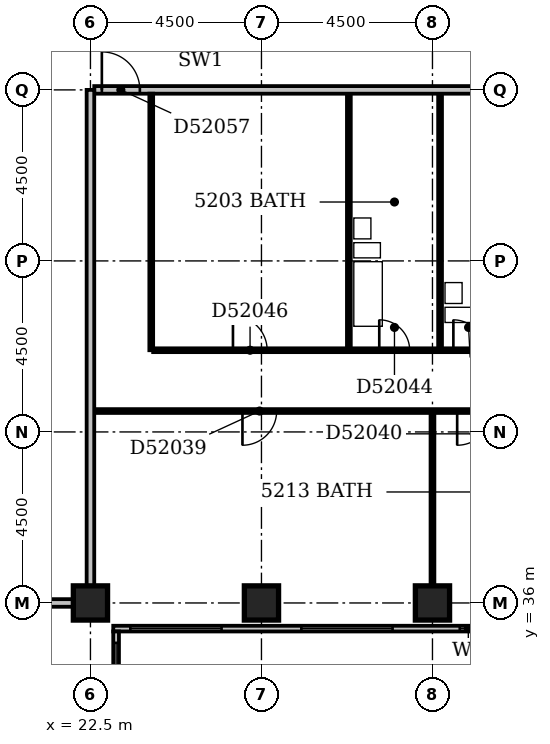
"""IFC4 building model, lengths in metres.
Left out: names, types, materials, properties, quantities, classifications, styles, units other than length and angle.
Written with IfcOpenShell. Run it as: python <this file> out.ifc"""

import sys

from ifc_helpers import new_model, si_unit, direction, frame, frame_2d, origin, origin_2d, place, context, subcontext, project, spatial, rectangle, extrude, element, fill, save


model = new_model("IFC4")
c1 = context("Model", 3, precision=1e-05, world=origin(), true_north=direction((0.0, 1.0)))
c2 = subcontext(c1, "Body", "Model", "MODEL_VIEW")
j1 = project(units=[si_unit("LENGTHUNIT", "METRE"), si_unit("PLANEANGLEUNIT", "RADIAN")], contexts=[c1])
p1 = place(None, origin())
s1 = spatial("IfcSite", under=j1, at=p1, CompositionType="ELEMENT")
p2 = place(p1, origin())
s2 = spatial("IfcBuilding", under=s1, at=p2, CompositionType="ELEMENT")
p3 = place(p2, frame((0.0, 0.0, 204.2)))
s3 = spatial("IfcBuildingStorey", under=s2, at=p3, CompositionType="ELEMENT", Elevation=204.2)
for number, where, z_axis, x_axis in (
    (1, (22.5, 36.0, -0.3), (0.0, 0.0, 1.0), (1.0, 0.0, 0.0)),
    (2, (27.0, 36.0, -0.3), (0.0, 0.0, 1.0), (1.0, 0.0, 0.0)),
    (3, (31.5, 36.0, -0.3), (0.0, 0.0, 1.0), (1.0, 0.0, 0.0)),
):
    element("IfcColumn", number, at=place(p3, frame(where, z_axis=z_axis, x_axis=x_axis)), inside=s3, PredefinedType="COLUMN", context=c2, shape_type="SweptSolid", body=[
        extrude(rectangle(XDim=0.9, YDim=0.9, at=origin_2d()), origin(), (0.0, 0.0, 1.0), 3.6),
    ])
p4 = place(p3, frame((23.175, 17.4, 0.0), z_axis=(0.0, 0.0, 1.0), x_axis=(0.0, 1.0, 0.0)))
e4 = element("IfcWall", 4, at=p4, inside=s3, PredefinedType="STANDARD", context=c2, shape_type="SweptSolid", body=[
    extrude(rectangle(XDim=17.85, YDim=0.15, at=frame_2d((8.925, 0.0))), origin(), (0.0, 0.0, 1.0), 2.7),
])
p5 = place(p4, frame((1.65, 0.0, 0.6)))
e5 = element("IfcOpeningElement", 5, at=p5, cuts=e4, PredefinedType="OPENING", context=c2, shape_type="SweptSolid", body=[
    extrude(rectangle(XDim=2.4, YDim=1.8, at=frame_2d((1.2, 0.9))), frame((0.0, 0.087, 0.0), z_axis=(0.0, -1.0, 0.0), x_axis=(1.0, 0.0, 0.0)), (0.0, 0.0, 1.0), 0.174),
])
p6 = place(p4, frame((6.15, 0.0, 0.6)))
e6 = element("IfcOpeningElement", 6, at=p6, cuts=e4, PredefinedType="OPENING", context=c2, shape_type="SweptSolid", body=[
    extrude(rectangle(XDim=2.4, YDim=1.8, at=frame_2d((1.2, 0.9))), frame((0.0, 0.087, 0.0), z_axis=(0.0, -1.0, 0.0), x_axis=(1.0, 0.0, 0.0)), (0.0, 0.0, 1.0), 0.174),
])
p7 = place(p4, frame((10.65, 0.0, 0.6)))
e7 = element("IfcOpeningElement", 7, at=p7, cuts=e4, PredefinedType="OPENING", context=c2, shape_type="SweptSolid", body=[
    extrude(rectangle(XDim=2.4, YDim=1.8, at=frame_2d((1.2, 0.9))), frame((0.0, 0.087, 0.0), z_axis=(0.0, -1.0, 0.0), x_axis=(1.0, 0.0, 0.0)), (0.0, 0.0, 1.0), 0.174),
])
p8 = place(p4, frame((15.15, 0.0, 0.6)))
e8 = element("IfcOpeningElement", 8, at=p8, cuts=e4, PredefinedType="OPENING", context=c2, shape_type="SweptSolid", body=[
    extrude(rectangle(XDim=2.4, YDim=1.8, at=frame_2d((1.2, 0.9))), frame((0.0, 0.087, 0.0), z_axis=(0.0, -1.0, 0.0), x_axis=(1.0, 0.0, 0.0)), (0.0, 0.0, 1.0), 0.174),
])
p9 = place(p3, frame((23.1, 35.325, 0.0), z_axis=(0.0, 0.0, 1.0), x_axis=(1.0, 0.0, 0.0)))
e9 = element("IfcWall", 9, at=p9, inside=s3, PredefinedType="STANDARD", context=c2, shape_type="SweptSolid", body=[
    extrude(rectangle(XDim=27.15, YDim=0.15, at=frame_2d((13.575, 0.0))), origin(), (0.0, 0.0, 1.0), 2.7),
])
p10 = place(p9, frame((0.45, 0.0, 0.6)))
e10 = element("IfcOpeningElement", 10, at=p10, cuts=e9, PredefinedType="OPENING", context=c2, shape_type="SweptSolid", body=[
    extrude(rectangle(XDim=2.4, YDim=1.8, at=frame_2d((1.2, 0.9))), frame((0.0, 0.087, 0.0), z_axis=(0.0, -1.0, 0.0), x_axis=(1.0, 0.0, 0.0)), (0.0, 0.0, 1.0), 0.174),
])
p11 = place(p9, frame((4.95, 0.0, 0.6)))
e11 = element("IfcOpeningElement", 11, at=p11, cuts=e9, PredefinedType="OPENING", context=c2, shape_type="SweptSolid", body=[
    extrude(rectangle(XDim=2.4, YDim=1.8, at=frame_2d((1.2, 0.9))), frame((0.0, 0.087, 0.0), z_axis=(0.0, -1.0, 0.0), x_axis=(1.0, 0.0, 0.0)), (0.0, 0.0, 1.0), 0.174),
])
p12 = place(p9, frame((9.118, 0.0, 0.6)))
e12 = element("IfcOpeningElement", 12, at=p12, cuts=e9, PredefinedType="OPENING", context=c2, shape_type="SweptSolid", body=[
    extrude(rectangle(XDim=0.45, YDim=1.8, at=frame_2d((0.225, 0.9))), frame((0.0, 0.087, 0.0), z_axis=(0.0, -1.0, 0.0), x_axis=(1.0, 0.0, 0.0)), (0.0, 0.0, 1.0), 0.174),
])
p13 = place(p9, frame((11.218, 0.0, 0.6)))
e13 = element("IfcOpeningElement", 13, at=p13, cuts=e9, PredefinedType="OPENING", context=c2, shape_type="SweptSolid", body=[
    extrude(rectangle(XDim=0.9, YDim=1.8, at=frame_2d((0.45, 0.9))), frame((0.0, 0.087, 0.0), z_axis=(0.0, -1.0, 0.0), x_axis=(1.0, 0.0, 0.0)), (0.0, 0.0, 1.0), 0.174),
])
p14 = place(p9, frame((13.61, 0.0, 0.6)))
e14 = element("IfcOpeningElement", 14, at=p14, cuts=e9, PredefinedType="OPENING", context=c2, shape_type="SweptSolid", body=[
    extrude(rectangle(XDim=1.2, YDim=1.8, at=frame_2d((0.6, 0.9))), frame((0.0, 0.087, 0.0), z_axis=(0.0, -1.0, 0.0), x_axis=(1.0, 0.0, 0.0)), (0.0, 0.0, 1.0), 0.174),
])
p15 = place(p9, frame((18.45, 0.0, 0.6)))
e15 = element("IfcOpeningElement", 15, at=p15, cuts=e9, PredefinedType="OPENING", context=c2, shape_type="SweptSolid", body=[
    extrude(rectangle(XDim=2.4, YDim=1.8, at=frame_2d((1.2, 0.9))), frame((0.0, 0.087, 0.0), z_axis=(0.0, -1.0, 0.0), x_axis=(1.0, 0.0, 0.0)), (0.0, 0.0, 1.0), 0.174),
])
p16 = place(p9, frame((22.95, 0.0, 0.6)))
e16 = element("IfcOpeningElement", 16, at=p16, cuts=e9, PredefinedType="OPENING", context=c2, shape_type="SweptSolid", body=[
    extrude(rectangle(XDim=2.4, YDim=1.8, at=frame_2d((1.2, 0.9))), frame((0.0, 0.087, 0.0), z_axis=(0.0, -1.0, 0.0), x_axis=(1.0, 0.0, 0.0)), (0.0, 0.0, 1.0), 0.174),
])
p17 = place(p3, frame((9.1, 36.0, 0.0), z_axis=(0.0, 0.0, 1.0), x_axis=(1.0, 0.0, 0.0)))
e17 = element("IfcWall", 17, at=p17, inside=s3, PredefinedType="PARTITIONING", context=c2, shape_type="SweptSolid", body=[
    extrude(rectangle(XDim=12.95, YDim=0.2, at=frame_2d((6.475, 0.0))), origin(), (0.0, 0.0, 1.0), 3.3),
])
p18 = place(p3, frame((22.5, 36.45, 0.0), z_axis=(0.0, 0.0, 1.0), x_axis=(0.0, 1.0, 0.0)))
e18 = element("IfcWall", 18, at=p18, inside=s3, PredefinedType="PARTITIONING", context=c2, shape_type="SweptSolid", body=[
    extrude(rectangle(XDim=13.05, YDim=0.2, at=frame_2d((6.525, 0.0))), origin(), (0.0, 0.0, 1.0), 3.3),
])
p19 = place(p3, frame((31.5, 36.45, 0.0), z_axis=(0.0, 0.0, 1.0), x_axis=(0.0, 1.0, 0.0)))
e19 = element("IfcWall", 19, at=p19, inside=s3, PredefinedType="PARTITIONING", context=c2, shape_type="SweptSolid", body=[
    extrude(rectangle(XDim=4.55, YDim=0.1, at=frame_2d((2.275, 0.0))), origin(), (0.0, 0.0, 1.0), 3.3),
])
p20 = place(p3, frame((22.6, 41.05, 0.0), z_axis=(0.0, 0.0, 1.0), x_axis=(1.0, 0.0, 0.0)))
e20 = element("IfcWall", 20, at=p20, inside=s3, PredefinedType="PARTITIONING", context=c2, shape_type="SweptSolid", body=[
    extrude(rectangle(XDim=22.3, YDim=0.1, at=frame_2d((11.15, 0.0))), origin(), (0.0, 0.0, 1.0), 3.3),
])
p21 = place(p20, frame((3.9, 0.0, 0.0)))
e21 = element("IfcOpeningElement", 21, at=p21, cuts=e20, PredefinedType="OPENING", context=c2, shape_type="SweptSolid", body=[
    extrude(rectangle(XDim=0.9, YDim=2.1, at=frame_2d((0.45, 1.05))), frame((0.0, 0.062, 0.0), z_axis=(0.0, -1.0, 0.0), x_axis=(1.0, 0.0, 0.0)), (0.0, 0.0, 1.0), 0.124),
])
p22 = place(p20, frame((9.55, 0.0, 0.0)))
e22 = element("IfcOpeningElement", 22, at=p22, cuts=e20, PredefinedType="OPENING", context=c2, shape_type="SweptSolid", body=[
    extrude(rectangle(XDim=0.9, YDim=2.1, at=frame_2d((0.45, 1.05))), frame((0.0, 0.062, 0.0), z_axis=(0.0, -1.0, 0.0), x_axis=(1.0, 0.0, 0.0)), (0.0, 0.0, 1.0), 0.124),
])
p23 = place(p20, frame((16.35, 0.0, 0.0)))
e23 = element("IfcOpeningElement", 23, at=p23, cuts=e20, PredefinedType="OPENING", context=c2, shape_type="SweptSolid", body=[
    extrude(rectangle(XDim=0.9, YDim=2.1, at=frame_2d((0.45, 1.05))), frame((0.0, 0.062, 0.0), z_axis=(0.0, -1.0, 0.0), x_axis=(1.0, 0.0, 0.0)), (0.0, 0.0, 1.0), 0.124),
])
p24 = place(p20, frame((19.7, 0.0, 0.0)))
e24 = element("IfcOpeningElement", 24, at=p24, cuts=e20, PredefinedType="OPENING", context=c2, shape_type="SweptSolid", body=[
    extrude(rectangle(XDim=0.9, YDim=2.1, at=frame_2d((0.45, 1.05))), frame((0.0, 0.062, 0.0), z_axis=(0.0, -1.0, 0.0), x_axis=(1.0, 0.0, 0.0)), (0.0, 0.0, 1.0), 0.124),
])
p25 = place(p3, frame((24.1, 42.65, 0.0), z_axis=(0.0, 0.0, 1.0), x_axis=(0.0, 1.0, 0.0)))
e25 = element("IfcWall", 25, at=p25, inside=s3, PredefinedType="PARTITIONING", context=c2, shape_type="SweptSolid", body=[
    extrude(rectangle(XDim=6.75, YDim=0.1, at=frame_2d((3.375, 0.0))), origin(), (0.0, 0.0, 1.0), 3.3),
])
p26 = place(p3, frame((24.15, 42.65, 0.0), z_axis=(0.0, 0.0, 1.0), x_axis=(1.0, 0.0, 0.0)))
e26 = element("IfcWall", 26, at=p26, inside=s3, PredefinedType="PARTITIONING", context=c2, shape_type="SweptSolid", body=[
    extrude(rectangle(XDim=20.75, YDim=0.1, at=frame_2d((10.375, 0.0))), origin(), (0.0, 0.0, 1.0), 3.3),
])
p27 = place(p26, frame((5.95, 0.0, 0.0)))
e27 = element("IfcOpeningElement", 27, at=p27, cuts=e26, PredefinedType="OPENING", context=c2, shape_type="SweptSolid", body=[
    extrude(rectangle(XDim=0.8, YDim=2.1, at=frame_2d((0.4, 1.05))), frame((0.0, 0.062, 0.0), z_axis=(0.0, -1.0, 0.0), x_axis=(1.0, 0.0, 0.0)), (0.0, 0.0, 1.0), 0.124),
])
p28 = place(p26, frame((11.35, 0.0, 0.0)))
e28 = element("IfcOpeningElement", 28, at=p28, cuts=e26, PredefinedType="OPENING", context=c2, shape_type="SweptSolid", body=[
    extrude(rectangle(XDim=0.8, YDim=2.1, at=frame_2d((0.4, 1.05))), frame((0.0, 0.062, 0.0), z_axis=(0.0, -1.0, 0.0), x_axis=(1.0, 0.0, 0.0)), (0.0, 0.0, 1.0), 0.124),
])
p29 = place(p26, frame((2.1, 0.0, 0.0)))
e29 = element("IfcOpeningElement", 29, at=p29, cuts=e26, PredefinedType="OPENING", context=c2, shape_type="SweptSolid", body=[
    extrude(rectangle(XDim=0.9, YDim=2.1, at=frame_2d((0.45, 1.05))), frame((0.0, 0.062, 0.0), z_axis=(0.0, -1.0, 0.0), x_axis=(1.0, 0.0, 0.0)), (0.0, 0.0, 1.0), 0.124),
])
p30 = place(p26, frame((19.35, 0.0, 0.0)))
e30 = element("IfcOpeningElement", 30, at=p30, cuts=e26, PredefinedType="OPENING", context=c2, shape_type="SweptSolid", body=[
    extrude(rectangle(XDim=0.8, YDim=2.1, at=frame_2d((0.4, 1.05))), frame((0.0, 0.062, 0.0), z_axis=(0.0, -1.0, 0.0), x_axis=(1.0, 0.0, 0.0)), (0.0, 0.0, 1.0), 0.124),
])
p31 = place(p26, frame((15.45, 0.0, 0.0)))
e31 = element("IfcOpeningElement", 31, at=p31, cuts=e26, PredefinedType="OPENING", context=c2, shape_type="SweptSolid", body=[
    extrude(rectangle(XDim=0.8, YDim=2.1, at=frame_2d((0.4, 1.05))), frame((0.0, 0.062, 0.0), z_axis=(0.0, -1.0, 0.0), x_axis=(1.0, 0.0, 0.0)), (0.0, 0.0, 1.0), 0.124),
])
p32 = place(p26, frame((9.45, 0.0, 0.0)))
e32 = element("IfcOpeningElement", 32, at=p32, cuts=e26, PredefinedType="OPENING", context=c2, shape_type="SweptSolid", body=[
    extrude(rectangle(XDim=0.8, YDim=2.1, at=frame_2d((0.4, 1.05))), frame((0.0, 0.062, 0.0), z_axis=(0.0, -1.0, 0.0), x_axis=(1.0, 0.0, 0.0)), (0.0, 0.0, 1.0), 0.124),
])
p33 = place(p26, frame((13.45, 0.0, 0.0)))
e33 = element("IfcOpeningElement", 33, at=p33, cuts=e26, PredefinedType="OPENING", context=c2, shape_type="SweptSolid", body=[
    extrude(rectangle(XDim=0.8, YDim=2.1, at=frame_2d((0.4, 1.05))), frame((0.0, 0.062, 0.0), z_axis=(0.0, -1.0, 0.0), x_axis=(1.0, 0.0, 0.0)), (0.0, 0.0, 1.0), 0.124),
])
p34 = place(p26, frame((17.35, 0.0, 0.0)))
e34 = element("IfcOpeningElement", 34, at=p34, cuts=e26, PredefinedType="OPENING", context=c2, shape_type="SweptSolid", body=[
    extrude(rectangle(XDim=0.8, YDim=2.1, at=frame_2d((0.4, 1.05))), frame((0.0, 0.062, 0.0), z_axis=(0.0, -1.0, 0.0), x_axis=(1.0, 0.0, 0.0)), (0.0, 0.0, 1.0), 0.124),
])
p35 = place(p26, frame((7.9, 0.0, 0.0)))
e35 = element("IfcOpeningElement", 35, at=p35, cuts=e26, PredefinedType="OPENING", context=c2, shape_type="SweptSolid", body=[
    extrude(rectangle(XDim=0.8, YDim=2.1, at=frame_2d((0.4, 1.05))), frame((0.0, 0.062, 0.0), z_axis=(0.0, -1.0, 0.0), x_axis=(1.0, 0.0, 0.0)), (0.0, 0.0, 1.0), 0.124),
])
for number, where, z_axis, x_axis in (
    (36, (29.3, 42.7, 0.0), (0.0, 0.0, 1.0), (0.0, 1.0, 0.0)),
    (37, (31.7, 42.7, 0.0), (0.0, 0.0, 1.0), (0.0, 1.0, 0.0)),
):
    element("IfcWall", number, at=place(p3, frame(where, z_axis=z_axis, x_axis=x_axis)), inside=s3, PredefinedType="PLUMBINGWALL", context=c2, shape_type="SweptSolid", body=[
        extrude(rectangle(XDim=6.7, YDim=0.1, at=frame_2d((3.35, 0.0))), origin(), (0.0, 0.0, 1.0), 3.3),
    ])
p36 = place(p3, frame((22.6, 49.5, 0.0), z_axis=(0.0, 0.0, 1.0), x_axis=(1.0, 0.0, 0.0)))
e38 = element("IfcWall", 38, at=p36, inside=s3, PredefinedType="PARTITIONING", context=c2, shape_type="SweptSolid", body=[
    extrude(rectangle(XDim=30.95, YDim=0.2, at=frame_2d((15.475, 0.0))), origin(), (0.0, 0.0, 1.0), 3.3),
])
p37 = place(p36, frame((0.2, 0.0, 0.0)))
e39 = element("IfcOpeningElement", 39, at=p37, cuts=e38, PredefinedType="OPENING", context=c2, shape_type="SweptSolid", body=[
    extrude(rectangle(XDim=1.0, YDim=2.1, at=frame_2d((0.5, 1.05))), frame((0.0, 0.112, 0.0), z_axis=(0.0, -1.0, 0.0), x_axis=(1.0, 0.0, 0.0)), (0.0, 0.0, 1.0), 0.224),
])
p38 = place(p36, frame((22.7, 0.0, 0.0)))
e40 = element("IfcOpeningElement", 40, at=p38, cuts=e38, PredefinedType="OPENING", context=c2, shape_type="SweptSolid", body=[
    extrude(rectangle(XDim=1.0, YDim=2.1, at=frame_2d((0.5, 1.05))), frame((0.0, 0.112, 0.0), z_axis=(0.0, -1.0, 0.0), x_axis=(1.0, 0.0, 0.0)), (0.0, 0.0, 1.0), 0.224),
])
p39 = place(p8, origin())
e41 = element("IfcWindow", 41, at=p39, inside=s3, PartitioningType="SINGLE_PANEL", PredefinedType="WINDOW", context=c2, shape_type="SweptSolid", body=[
    extrude(rectangle(XDim=2.4, YDim=1.8, at=frame_2d((1.2, 0.9))), frame((0.0, 0.03, 0.0), z_axis=(0.0, -1.0, 0.0), x_axis=(1.0, 0.0, 0.0)), (0.0, 0.0, 1.0), 0.06),
])
fill(e8, e41)
p40 = place(p10, origin())
e42 = element("IfcWindow", 42, at=p40, inside=s3, PartitioningType="SINGLE_PANEL", PredefinedType="WINDOW", context=c2, shape_type="SweptSolid", body=[
    extrude(rectangle(XDim=2.4, YDim=1.8, at=frame_2d((1.2, 0.9))), frame((0.0, 0.03, 0.0), z_axis=(0.0, -1.0, 0.0), x_axis=(1.0, 0.0, 0.0)), (0.0, 0.0, 1.0), 0.06),
])
fill(e10, e42)
p41 = place(p11, origin())
e43 = element("IfcWindow", 43, at=p41, inside=s3, PartitioningType="SINGLE_PANEL", PredefinedType="WINDOW", context=c2, shape_type="SweptSolid", body=[
    extrude(rectangle(XDim=2.4, YDim=1.8, at=frame_2d((1.2, 0.9))), frame((0.0, 0.03, 0.0), z_axis=(0.0, -1.0, 0.0), x_axis=(1.0, 0.0, 0.0)), (0.0, 0.0, 1.0), 0.06),
])
fill(e11, e43)
p42 = place(p12, origin())
e44 = element("IfcWindow", 44, at=p42, inside=s3, PartitioningType="SINGLE_PANEL", PredefinedType="WINDOW", context=c2, shape_type="SweptSolid", body=[
    extrude(rectangle(XDim=0.45, YDim=1.8, at=frame_2d((0.225, 0.9))), frame((0.0, 0.03, 0.0), z_axis=(0.0, -1.0, 0.0), x_axis=(1.0, 0.0, 0.0)), (0.0, 0.0, 1.0), 0.06),
])
fill(e12, e44)
p43 = place(p21, frame((0.9, 0.0, 0.0), z_axis=(0.0, 0.0, 1.0), x_axis=(-1.0, 0.0, 0.0)))
e45 = element("IfcDoor", 45, at=p43, inside=s3, OperationType="SINGLE_SWING_RIGHT", PredefinedType="DOOR", context=c2, shape_type="SweptSolid", body=[
    extrude(rectangle(XDim=0.9, YDim=2.1, at=frame_2d((0.45, 1.05))), frame((0.0, 0.025, 0.0), z_axis=(0.0, -1.0, 0.0), x_axis=(1.0, 0.0, 0.0)), (0.0, 0.0, 1.0), 0.05),
])
fill(e21, e45)
p44 = place(p22, frame((0.9, 0.0, 0.0), z_axis=(0.0, 0.0, 1.0), x_axis=(-1.0, 0.0, 0.0)))
e46 = element("IfcDoor", 46, at=p44, inside=s3, OperationType="SINGLE_SWING_RIGHT", PredefinedType="DOOR", context=c2, shape_type="SweptSolid", body=[
    extrude(rectangle(XDim=0.9, YDim=2.1, at=frame_2d((0.45, 1.05))), frame((0.0, 0.025, 0.0), z_axis=(0.0, -1.0, 0.0), x_axis=(1.0, 0.0, 0.0)), (0.0, 0.0, 1.0), 0.05),
])
fill(e22, e46)
p45 = place(p27, origin())
e47 = element("IfcDoor", 47, at=p45, inside=s3, OperationType="SINGLE_SWING_LEFT", PredefinedType="DOOR", context=c2, shape_type="SweptSolid", body=[
    extrude(rectangle(XDim=0.8, YDim=2.1, at=frame_2d((0.4, 1.05))), frame((0.0, 0.025, 0.0), z_axis=(0.0, -1.0, 0.0), x_axis=(1.0, 0.0, 0.0)), (0.0, 0.0, 1.0), 0.05),
])
fill(e27, e47)
p46 = place(p29, origin())
e48 = element("IfcDoor", 48, at=p46, inside=s3, OperationType="SINGLE_SWING_LEFT", PredefinedType="DOOR", context=c2, shape_type="SweptSolid", body=[
    extrude(rectangle(XDim=0.9, YDim=2.1, at=frame_2d((0.45, 1.05))), frame((0.0, 0.025, 0.0), z_axis=(0.0, -1.0, 0.0), x_axis=(1.0, 0.0, 0.0)), (0.0, 0.0, 1.0), 0.05),
])
fill(e29, e48)
p47 = place(p35, origin())
e49 = element("IfcDoor", 49, at=p47, inside=s3, OperationType="SINGLE_SWING_LEFT", PredefinedType="DOOR", context=c2, shape_type="SweptSolid", body=[
    extrude(rectangle(XDim=0.8, YDim=2.1, at=frame_2d((0.4, 1.05))), frame((0.0, 0.025, 0.0), z_axis=(0.0, -1.0, 0.0), x_axis=(1.0, 0.0, 0.0)), (0.0, 0.0, 1.0), 0.05),
])
fill(e35, e49)
p48 = place(p37, origin())
e50 = element("IfcDoor", 50, at=p48, inside=s3, OperationType="SINGLE_SWING_LEFT", PredefinedType="DOOR", context=c2, shape_type="SweptSolid", body=[
    extrude(rectangle(XDim=1.0, YDim=2.1, at=frame_2d((0.5, 1.05))), frame((0.0, 0.025, 0.0), z_axis=(0.0, -1.0, 0.0), x_axis=(1.0, 0.0, 0.0)), (0.0, 0.0, 1.0), 0.05),
])
fill(e39, e50)
save(model, sys.argv[1])
